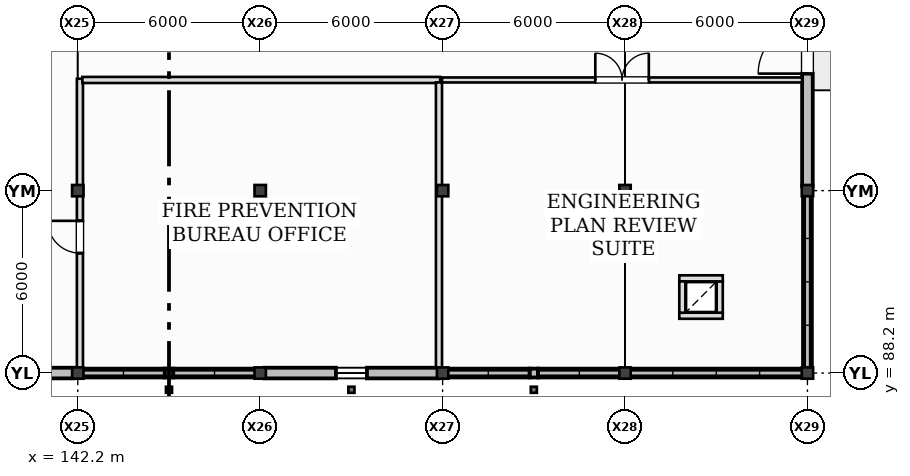
"""IFC4 building model, lengths in metres.
Left out: names, types, materials, properties, quantities, classifications, styles, units other than length and angle.
Written with IfcOpenShell. Run it as: python <this file> out.ifc"""

import sys

from ifc_helpers import new_model, si_unit, direction, frame, frame_2d, origin, origin_2d, place, context, subcontext, project, spatial, rectangle, hollow_rectangle, i_section, extrude, element, fill, save


model = new_model("IFC4")
c1 = context("Model", 3, precision=1e-05, world=origin(), true_north=direction((0.0, 1.0)))
c2 = subcontext(c1, "Body", "Model", "MODEL_VIEW")
j1 = project(units=[si_unit("LENGTHUNIT", "METRE"), si_unit("PLANEANGLEUNIT", "RADIAN")], contexts=[c1])
p1 = place(None, origin())
s1 = spatial("IfcSite", under=j1, at=p1, CompositionType="ELEMENT")
p2 = place(p1, origin())
s2 = spatial("IfcBuilding", under=s1, at=p2, CompositionType="ELEMENT")
p3 = place(p2, origin())
s3 = spatial("IfcBuildingStorey", under=s2, at=p3, CompositionType="ELEMENT", Elevation=0.0)
for number, where, z_axis, x_axis in (
    (1, (142.2, 88.2, 0.0), (0.0, 0.0, 1.0), (1.0, 0.0, 0.0)),
    (2, (142.2, 94.2, 0.0), (0.0, 0.0, 1.0), (1.0, 0.0, 0.0)),
    (3, (148.2, 88.2, 0.0), (0.0, 0.0, 1.0), (1.0, 0.0, 0.0)),
    (4, (148.2, 94.2, 0.0), (0.0, 0.0, 1.0), (1.0, 0.0, 0.0)),
    (5, (154.2, 88.2, 0.0), (0.0, 0.0, 1.0), (1.0, 0.0, 0.0)),
    (6, (154.2, 94.2, 0.0), (0.0, 0.0, 1.0), (1.0, 0.0, 0.0)),
    (7, (160.2, 88.2, 0.0), (0.0, 0.0, 1.0), (1.0, 0.0, 0.0)),
    (8, (160.2, 94.2, 0.0), (0.0, 0.0, 1.0), (1.0, 0.0, 0.0)),
    (9, (166.2, 88.2, 0.0), (0.0, 0.0, 1.0), (1.0, 0.0, 0.0)),
    (10, (166.2, 94.2, 0.0), (0.0, 0.0, 1.0), (1.0, 0.0, 0.0)),
):
    element("IfcColumn", number, at=place(p3, frame(where, z_axis=z_axis, x_axis=x_axis)), inside=s3, PredefinedType="COLUMN", context=c2, shape_type="SweptSolid", body=[
        extrude(i_section(OverallWidth=0.374, OverallDepth=0.372, WebThickness=0.016, FlangeThickness=0.026, at=origin_2d()), origin(), (0.0, 0.0, 1.0), 6.0),
    ])
for number, where, z_axis, x_axis in (
    (11, (145.2, 87.65, -0.35), (0.0, 0.0, 1.0), (1.0, 0.0, 0.0)),
    (12, (151.2, 87.65, -0.35), (0.0, 0.0, 1.0), (1.0, 0.0, 0.0)),
    (13, (157.2, 87.65, -0.35), (0.0, 0.0, 1.0), (1.0, 0.0, 0.0)),
):
    element("IfcColumn", number, at=place(p3, frame(where, z_axis=z_axis, x_axis=x_axis)), inside=s3, PredefinedType="PILASTER", context=c2, shape_type="SweptSolid", body=[
        extrude(hollow_rectangle(XDim=0.2, YDim=0.2, WallThickness=0.01, at=origin_2d()), origin(), (0.0, 0.0, 1.0), 6.35),
    ])
p4 = place(p3, frame((136.345, 88.2, 0.0), z_axis=(0.0, 0.0, 1.0), x_axis=(1.0, 0.0, 0.0)))
e14 = element("IfcWall", 14, at=p4, inside=s3, PredefinedType="STANDARD", context=c2, shape_type="SweptSolid", body=[
    extrude(rectangle(XDim=5.71, YDim=0.35, at=frame_2d((2.855, 0.0))), origin(), (0.0, 0.0, 1.0), 5.113),
])
p5 = place(p4, frame((1.68, 0.0, 0.0)))
e15 = element("IfcOpeningElement", 15, at=p5, cuts=e14, PredefinedType="OPENING", context=c2, shape_type="SweptSolid", body=[
    extrude(rectangle(XDim=1.95, YDim=2.35, at=frame_2d((0.975, 1.175))), frame((0.0, 0.185, 0.0), z_axis=(0.0, -1.0, 0.0), x_axis=(1.0, 0.0, 0.0)), (0.0, 0.0, 1.0), 0.37),
])
p6 = place(p3, frame((145.06, 88.2, 0.0), z_axis=(0.0, 0.0, 1.0), x_axis=(1.0, 0.0, 0.0)))
e16 = element("IfcWall", 16, at=p6, inside=s3, PredefinedType="STANDARD", context=c2, shape_type="SweptSolid", body=[
    extrude(rectangle(XDim=0.28, YDim=0.29, at=frame_2d((0.14, 0.0))), origin(), (0.0, 0.0, 1.0), 5.113),
])
p7 = place(p3, frame((142.345, 88.2, 0.0), z_axis=(0.0, 0.0, 1.0), x_axis=(1.0, 0.0, 0.0)))
e17 = element("IfcWall", 17, at=p7, inside=s3, PredefinedType="STANDARD", context=c2, shape_type="SweptSolid", body=[
    extrude(rectangle(XDim=2.715, YDim=0.29, at=frame_2d((1.357, 0.0))), origin(), (0.0, 0.0, 1.0), 0.32),
])
p8 = place(p3, frame((145.34, 88.2, 0.0), z_axis=(0.0, 0.0, 1.0), x_axis=(1.0, 0.0, 0.0)))
e18 = element("IfcWall", 18, at=p8, inside=s3, PredefinedType="STANDARD", context=c2, shape_type="SweptSolid", body=[
    extrude(rectangle(XDim=2.715, YDim=0.29, at=frame_2d((1.357, 0.0))), origin(), (0.0, 0.0, 1.0), 0.44),
])
p9 = place(p3, frame((148.345, 88.2, 0.0), z_axis=(0.0, 0.0, 1.0), x_axis=(1.0, 0.0, 0.0)))
e19 = element("IfcWall", 19, at=p9, inside=s3, PredefinedType="STANDARD", context=c2, shape_type="SweptSolid", body=[
    extrude(rectangle(XDim=5.71, YDim=0.35, at=frame_2d((2.855, 0.0))), origin(), (0.0, 0.0, 1.0), 5.113),
])
p10 = place(p9, frame((2.345, 0.0, 0.85)))
e20 = element("IfcOpeningElement", 20, at=p10, cuts=e19, PredefinedType="OPENING", context=c2, shape_type="SweptSolid", body=[
    extrude(rectangle(XDim=1.02, YDim=2.05, at=frame_2d((0.51, 1.025))), frame((0.0, 0.185, 0.0), z_axis=(0.0, -1.0, 0.0), x_axis=(1.0, 0.0, 0.0)), (0.0, 0.0, 1.0), 0.37),
])
p11 = place(p3, frame((157.06, 88.2, 0.0), z_axis=(0.0, 0.0, 1.0), x_axis=(1.0, 0.0, 0.0)))
e21 = element("IfcWall", 21, at=p11, inside=s3, PredefinedType="STANDARD", context=c2, shape_type="SweptSolid", body=[
    extrude(rectangle(XDim=0.28, YDim=0.29, at=frame_2d((0.14, 0.0))), origin(), (0.0, 0.0, 1.0), 5.113),
])
p12 = place(p3, frame((154.345, 88.2, 0.0), z_axis=(0.0, 0.0, 1.0), x_axis=(1.0, 0.0, 0.0)))
e22 = element("IfcWall", 22, at=p12, inside=s3, PredefinedType="STANDARD", context=c2, shape_type="SweptSolid", body=[
    extrude(rectangle(XDim=2.715, YDim=0.29, at=frame_2d((1.357, 0.0))), origin(), (0.0, 0.0, 1.0), 0.56),
])
p13 = place(p3, frame((157.34, 88.2, 0.0), z_axis=(0.0, 0.0, 1.0), x_axis=(1.0, 0.0, 0.0)))
e23 = element("IfcWall", 23, at=p13, inside=s3, PredefinedType="STANDARD", context=c2, shape_type="SweptSolid", body=[
    extrude(rectangle(XDim=2.715, YDim=0.29, at=frame_2d((1.357, 0.0))), origin(), (0.0, 0.0, 1.0), 0.68),
])
p14 = place(p3, frame((160.345, 88.2, 0.0), z_axis=(0.0, 0.0, 1.0), x_axis=(1.0, 0.0, 0.0)))
e24 = element("IfcWall", 24, at=p14, inside=s3, PredefinedType="STANDARD", context=c2, shape_type="SweptSolid", body=[
    extrude(rectangle(XDim=5.71, YDim=0.29, at=frame_2d((2.855, 0.0))), origin(), (0.0, 0.0, 1.0), 0.8),
])
p15 = place(p3, frame((166.2, 88.345, 0.0), z_axis=(0.0, 0.0, 1.0), x_axis=(0.0, 1.0, 0.0)))
e25 = element("IfcWall", 25, at=p15, inside=s3, PredefinedType="STANDARD", context=c2, shape_type="SweptSolid", body=[
    extrude(rectangle(XDim=5.71, YDim=0.29, at=frame_2d((2.855, 0.0))), origin(), (0.0, 0.0, 1.0), 0.92),
])
p16 = place(p3, frame((166.2, 94.345, 0.0), z_axis=(0.0, 0.0, 1.0), x_axis=(0.0, 1.0, 0.0)))
e26 = element("IfcWall", 26, at=p16, inside=s3, PredefinedType="STANDARD", context=c2, shape_type="SweptSolid", body=[
    extrude(rectangle(XDim=5.71, YDim=0.35, at=frame_2d((2.855, 0.0))), origin(), (0.0, 0.0, 1.0), 5.044),
])
p17 = place(p16, frame((3.704, 0.0, 0.0)))
e27 = element("IfcOpeningElement", 27, at=p17, cuts=e26, PredefinedType="OPENING", context=c2, shape_type="SweptSolid", body=[
    extrude(rectangle(XDim=1.62, YDim=2.2, at=frame_2d((0.81, 1.1))), frame((0.0, 0.185, 0.0), z_axis=(0.0, -1.0, 0.0), x_axis=(1.0, 0.0, 0.0)), (0.0, 0.0, 1.0), 0.37),
])
p18 = place(p3, frame((161.985, 90.085, 0.0), z_axis=(0.0, 0.0, 1.0), x_axis=(1.0, 0.0, 0.0)))
e28 = element("IfcWall", 28, at=p18, inside=s3, PredefinedType="PARTITIONING", context=c2, shape_type="SweptSolid", body=[
    extrude(rectangle(XDim=1.43, YDim=0.2, at=frame_2d((0.715, 0.0))), origin(), (0.0, 0.0, 1.0), 5.68),
])
p19 = place(p3, frame((163.315, 90.185, 0.0), z_axis=(0.0, 0.0, 1.0), x_axis=(0.0, 1.0, 0.0)))
e29 = element("IfcWall", 29, at=p19, inside=s3, PredefinedType="PARTITIONING", context=c2, shape_type="SweptSolid", body=[
    extrude(rectangle(XDim=1.03, YDim=0.2, at=frame_2d((0.515, 0.0))), origin(), (0.0, 0.0, 1.0), 5.68),
])
p20 = place(p3, frame((163.415, 91.315, 0.0), z_axis=(0.0, 0.0, 1.0), x_axis=(-1.0, 0.0, 0.0)))
e30 = element("IfcWall", 30, at=p20, inside=s3, PredefinedType="PARTITIONING", context=c2, shape_type="SweptSolid", body=[
    extrude(rectangle(XDim=1.43, YDim=0.2, at=frame_2d((0.715, 0.0))), origin(), (0.0, 0.0, 1.0), 5.68),
])
p21 = place(p3, frame((162.085, 91.215, 0.0), z_axis=(0.0, 0.0, 1.0), x_axis=(0.0, -1.0, 0.0)))
e31 = element("IfcWall", 31, at=p21, inside=s3, PredefinedType="PARTITIONING", context=c2, shape_type="SweptSolid", body=[
    extrude(rectangle(XDim=1.03, YDim=0.2, at=frame_2d((0.515, 0.0))), origin(), (0.0, 0.0, 1.0), 5.249),
])
p22 = place(p3, frame((142.27, 88.375, 0.0), z_axis=(0.0, 0.0, 1.0), x_axis=(0.0, 1.0, 0.0)))
e32 = element("IfcWall", 32, at=p22, inside=s3, PredefinedType="PARTITIONING", context=c2, shape_type="SweptSolid", body=[
    extrude(rectangle(XDim=9.505, YDim=0.2, at=frame_2d((4.752, 0.0))), origin(), (0.0, 0.0, 1.0), 5.044),
])
p23 = place(p22, frame((3.771, 0.0, 0.0)))
e33 = element("IfcOpeningElement", 33, at=p23, cuts=e32, PredefinedType="OPENING", context=c2, shape_type="SweptSolid", body=[
    extrude(rectangle(XDim=1.06, YDim=2.25, at=frame_2d((0.53, 1.125))), frame((0.0, 0.11, 0.0), z_axis=(0.0, -1.0, 0.0), x_axis=(1.0, 0.0, 0.0)), (0.0, 0.0, 1.0), 0.22),
])
p24 = place(p3, frame((142.35, 97.84, 0.0), z_axis=(0.0, 0.0, 1.0), x_axis=(1.0, 0.0, 0.0)))
e34 = element("IfcWall", 34, at=p24, inside=s3, PredefinedType="PARTITIONING", context=c2, shape_type="SweptSolid", body=[
    extrude(rectangle(XDim=11.77, YDim=0.2, at=frame_2d((5.885, 0.0))), origin(), (0.0, 0.0, 1.0), 5.68),
])
p25 = place(p3, frame((154.08, 97.76, 0.0), z_axis=(0.0, 0.0, 1.0), x_axis=(0.0, -1.0, 0.0)))
e35 = element("IfcWall", 35, at=p25, inside=s3, PredefinedType="PARTITIONING", context=c2, shape_type="SweptSolid", body=[
    extrude(rectangle(XDim=9.385, YDim=0.2, at=frame_2d((4.692, 0.0))), origin(), (0.0, 0.0, 1.0), 5.044),
])
p26 = place(p3, frame((154.18, 97.84, 0.0), z_axis=(0.0, 0.0, 1.0), x_axis=(1.0, 0.0, 0.0)))
e36 = element("IfcWall", 36, at=p26, inside=s3, PredefinedType="PARTITIONING", context=c2, shape_type="SweptSolid", body=[
    extrude(rectangle(XDim=11.845, YDim=0.165, at=frame_2d((5.922, 0.0))), origin(), (0.0, 0.0, 1.0), 5.68),
])
p27 = place(p26, frame((5.042, 0.0, 0.0)))
e37 = element("IfcOpeningElement", 37, at=p27, cuts=e36, PredefinedType="OPENING", context=c2, shape_type="SweptSolid", body=[
    extrude(rectangle(XDim=1.76, YDim=2.26, at=frame_2d((0.88, 1.13))), frame((0.0, 0.093, 0.0), z_axis=(0.0, -1.0, 0.0), x_axis=(1.0, 0.0, 0.0)), (0.0, 0.0, 1.0), 0.185),
])
p28 = place(p10, origin())
e38 = element("IfcWindow", 38, at=p28, inside=s3, PartitioningType="SINGLE_PANEL", PredefinedType="WINDOW", context=c2, shape_type="SweptSolid", body=[
    extrude(rectangle(XDim=1.02, YDim=2.05, at=frame_2d((0.51, 1.025))), frame((0.0, 0.03, 0.0), z_axis=(0.0, -1.0, 0.0), x_axis=(1.0, 0.0, 0.0)), (0.0, 0.0, 1.0), 0.06),
])
fill(e20, e38)
p29 = place(p17, frame((1.62, 0.0, 0.0), z_axis=(0.0, 0.0, 1.0), x_axis=(-1.0, 0.0, 0.0)))
e39 = element("IfcDoor", 39, at=p29, inside=s3, OperationType="SINGLE_SWING_LEFT", PredefinedType="DOOR", context=c2, shape_type="SweptSolid", body=[
    extrude(rectangle(XDim=1.62, YDim=2.2, at=frame_2d((0.81, 1.1))), frame((0.0, 0.025, 0.0), z_axis=(0.0, -1.0, 0.0), x_axis=(1.0, 0.0, 0.0)), (0.0, 0.0, 1.0), 0.05),
])
fill(e27, e39)
p30 = place(p23, frame((1.06, 0.0, 0.0), z_axis=(0.0, 0.0, 1.0), x_axis=(-1.0, 0.0, 0.0)))
e40 = element("IfcDoor", 40, at=p30, inside=s3, OperationType="SINGLE_SWING_RIGHT", PredefinedType="DOOR", context=c2, shape_type="SweptSolid", body=[
    extrude(rectangle(XDim=1.06, YDim=2.25, at=frame_2d((0.53, 1.125))), frame((0.0, 0.025, 0.0), z_axis=(0.0, -1.0, 0.0), x_axis=(1.0, 0.0, 0.0)), (0.0, 0.0, 1.0), 0.05),
])
fill(e33, e40)
p31 = place(p27, frame((1.76, 0.0, 0.0), z_axis=(0.0, 0.0, 1.0), x_axis=(-1.0, 0.0, 0.0)))
e41 = element("IfcDoor", 41, at=p31, inside=s3, OperationType="DOUBLE_DOOR_SINGLE_SWING", PredefinedType="DOOR", context=c2, shape_type="SweptSolid", body=[
    extrude(rectangle(XDim=1.76, YDim=2.26, at=frame_2d((0.88, 1.13))), frame((0.0, 0.025, 0.0), z_axis=(0.0, -1.0, 0.0), x_axis=(1.0, 0.0, 0.0)), (0.0, 0.0, 1.0), 0.05),
])
fill(e37, e41)
save(model, sys.argv[1])
